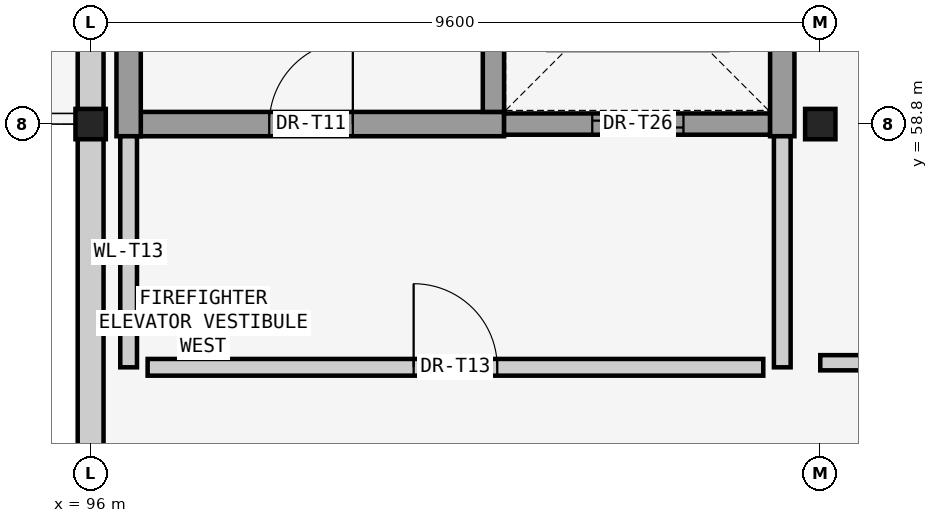
"""IFC4 building model, lengths in metres.
Left out: names, types, materials, properties, quantities, classifications, styles, units other than length and angle.
Written with IfcOpenShell. Run it as: python <this file> out.ifc"""

import sys

from ifc_helpers import new_model, si_unit, direction, frame, frame_2d, origin, origin_2d, place, context, subcontext, project, spatial, rectangle, i_section, extrude, element, fill, save


model = new_model("IFC4")
c1 = context("Model", 3, precision=1e-05, world=origin(), true_north=direction((0.0, 1.0)))
c2 = subcontext(c1, "Body", "Model", "MODEL_VIEW")
j1 = project(units=[si_unit("LENGTHUNIT", "METRE"), si_unit("PLANEANGLEUNIT", "RADIAN")], contexts=[c1])
p1 = place(None, origin())
s1 = spatial("IfcSite", under=j1, at=p1, CompositionType="ELEMENT")
p2 = place(p1, origin())
s2 = spatial("IfcBuilding", under=s1, at=p2, CompositionType="ELEMENT")
p3 = place(p2, frame((0.0, 0.0, 15.0)))
s3 = spatial("IfcBuildingStorey", under=s2, at=p3, CompositionType="ELEMENT", Elevation=15.0)
p4 = place(p3, frame((96.0, 58.8, 0.0), z_axis=(0.0, 0.0, 1.0), x_axis=(1.0, 0.0, 0.0)))
e1 = element("IfcColumn", 1, at=p4, inside=s3, PredefinedType="COLUMN", context=c2, shape_type="SweptSolid", body=[
    extrude(i_section(OverallWidth=0.399, OverallDepth=0.399, WebThickness=0.03, FlangeThickness=0.039, at=origin_2d()), origin(), (0.0, 0.0, 1.0), 4.5),
])
p5 = place(p3, frame((105.6, 58.8, 0.0), z_axis=(0.0, 0.0, 1.0), x_axis=(1.0, 0.0, 0.0)))
e2 = element("IfcColumn", 2, at=p5, inside=s3, PredefinedType="COLUMN", context=c2, shape_type="SweptSolid", body=[
    extrude(i_section(OverallWidth=0.399, OverallDepth=0.399, WebThickness=0.03, FlangeThickness=0.039, at=origin_2d()), origin(), (0.0, 0.0, 1.0), 4.58),
])
p6 = place(p3, frame((96.0, 52.012, 0.0), z_axis=(0.0, 0.0, 1.0), x_axis=(0.0, 1.0, 0.0)))
e3 = element("IfcWall", 3, at=p6, inside=s3, PredefinedType="SOLIDWALL", context=c2, shape_type="SweptSolid", body=[
    extrude(rectangle(XDim=15.158, YDim=0.34, at=frame_2d((7.579, 0.0))), origin(), (0.0, 0.0, 1.0), 3.777),
])
p7 = place(p3, frame((96.66, 58.8, 0.0), z_axis=(0.0, 0.0, 1.0), x_axis=(1.0, 0.0, 0.0)))
e4 = element("IfcWall", 4, at=p7, inside=s3, PredefinedType="SHEAR", context=c2, shape_type="SweptSolid", body=[
    extrude(rectangle(XDim=4.78, YDim=0.32, at=frame_2d((2.39, 0.0))), origin(), (0.0, 0.0, 1.0), 4.56),
])
p8 = place(p7, frame((1.69, 0.0, 0.0)))
e5 = element("IfcOpeningElement", 5, at=p8, cuts=e4, PredefinedType="OPENING", context=c2, shape_type="SweptSolid", body=[
    extrude(rectangle(XDim=1.1, YDim=2.2, at=frame_2d((0.55, 1.1))), frame((0.0, 0.17, 0.0), z_axis=(0.0, -1.0, 0.0), x_axis=(1.0, 0.0, 0.0)), (0.0, 0.0, 1.0), 0.34),
])
p9 = place(p3, frame((101.44, 58.8, 0.0), z_axis=(0.0, 0.0, 1.0), x_axis=(1.0, 0.0, 0.0)))
e6 = element("IfcWall", 6, at=p9, inside=s3, PredefinedType="SHEAR", context=c2, shape_type="SweptSolid", body=[
    extrude(rectangle(XDim=3.5, YDim=0.28, at=frame_2d((1.75, 0.0))), origin(), (0.0, 0.0, 1.0), 4.56),
])
p10 = place(p9, frame((1.16, 0.0, 0.0)))
e7 = element("IfcOpeningElement", 7, at=p10, cuts=e6, PredefinedType="OPENING", context=c2, shape_type="SweptSolid", body=[
    extrude(rectangle(XDim=1.2, YDim=2.2, at=frame_2d((0.6, 1.1))), frame((0.0, 0.15, 0.0), z_axis=(0.0, -1.0, 0.0), x_axis=(1.0, 0.0, 0.0)), (0.0, 0.0, 1.0), 0.3),
])
for number, where, z_axis, x_axis in (
    (8, (96.5, 67.0, 0.0), (0.0, 0.0, 1.0), (0.0, -1.0, 0.0)),
    (9, (105.1, 58.64, 0.0), (0.0, 0.0, 1.0), (0.0, 1.0, 0.0)),
):
    element("IfcWall", number, at=place(p3, frame(where, z_axis=z_axis, x_axis=x_axis)), inside=s3, PredefinedType="SHEAR", context=c2, shape_type="SweptSolid", body=[
        extrude(rectangle(XDim=8.36, YDim=0.32, at=frame_2d((4.18, 0.0))), origin(), (0.0, 0.0, 1.0), 4.56),
    ])
p11 = place(p3, frame((101.3, 58.96, 0.0), z_axis=(0.0, 0.0, 1.0), x_axis=(0.0, 1.0, 0.0)))
e10 = element("IfcWall", 10, at=p11, inside=s3, PredefinedType="SHEAR", context=c2, shape_type="SweptSolid", body=[
    extrude(rectangle(XDim=7.72, YDim=0.28, at=frame_2d((3.86, 0.0))), origin(), (0.0, 0.0, 1.0), 4.56),
])
for number, where, z_axis, x_axis in (
    (11, (96.5, 55.6, 0.0), (0.0, 0.0, 1.0), (0.0, 1.0, 0.0)),
    (12, (105.1, 55.6, 0.0), (0.0, 0.0, 1.0), (0.0, 1.0, 0.0)),
):
    element("IfcWall", number, at=place(p3, frame(where, z_axis=z_axis, x_axis=x_axis)), inside=s3, PredefinedType="SOLIDWALL", context=c2, shape_type="SweptSolid", body=[
        extrude(rectangle(XDim=3.04, YDim=0.22, at=frame_2d((1.52, 0.0))), origin(), (0.0, 0.0, 1.0), 4.32),
    ])
p12 = place(p3, frame((96.75, 55.6, 0.0), z_axis=(0.0, 0.0, 1.0), x_axis=(1.0, 0.0, 0.0)))
e13 = element("IfcWall", 13, at=p12, inside=s3, PredefinedType="SOLIDWALL", context=c2, shape_type="SweptSolid", body=[
    extrude(rectangle(XDim=8.1, YDim=0.22, at=frame_2d((4.05, 0.0))), origin(), (0.0, 0.0, 1.0), 4.32),
])
p13 = place(p12, frame((3.5, 0.0, 0.0)))
e14 = element("IfcOpeningElement", 14, at=p13, cuts=e13, PredefinedType="OPENING", context=c2, shape_type="SweptSolid", body=[
    extrude(rectangle(XDim=1.1, YDim=2.2, at=frame_2d((0.55, 1.1))), frame((0.0, 0.12, 0.0), z_axis=(0.0, -1.0, 0.0), x_axis=(1.0, 0.0, 0.0)), (0.0, 0.0, 1.0), 0.24),
])
p14 = place(p3, frame((105.6, 55.66, 0.0), z_axis=(0.0, 0.0, 1.0), x_axis=(1.0, 0.0, 0.0)))
e15 = element("IfcWall", 15, at=p14, inside=s3, PredefinedType="SOLIDWALL", context=c2, shape_type="SweptSolid", body=[
    extrude(rectangle(XDim=19.4, YDim=0.2, at=frame_2d((9.7, 0.0))), origin(), (0.0, 0.0, 1.0), 4.45),
])
p15 = place(p14, frame((9.225, 0.0, 0.0)))
e16 = element("IfcOpeningElement", 16, at=p15, cuts=e15, PredefinedType="OPENING", context=c2, shape_type="SweptSolid", body=[
    extrude(rectangle(XDim=0.95, YDim=2.15, at=frame_2d((0.475, 1.075))), frame((0.0, 0.11, 0.0), z_axis=(0.0, -1.0, 0.0), x_axis=(1.0, 0.0, 0.0)), (0.0, 0.0, 1.0), 0.22),
])
p16 = place(p8, origin())
e17 = element("IfcDoor", 17, at=p16, inside=s3, OperationType="SINGLE_SWING_RIGHT", PredefinedType="DOOR", context=c2, shape_type="SweptSolid", body=[
    extrude(rectangle(XDim=1.1, YDim=2.2, at=frame_2d((0.55, 1.1))), frame((0.0, 0.025, 0.0), z_axis=(0.0, -1.0, 0.0), x_axis=(1.0, 0.0, 0.0)), (0.0, 0.0, 1.0), 0.05),
])
fill(e5, e17)
p17 = place(p10, origin())
e18 = element("IfcDoor", 18, at=p17, inside=s3, OperationType="SLIDING_TO_RIGHT", PredefinedType="DOOR", context=c2, shape_type="SweptSolid", body=[
    extrude(rectangle(XDim=1.2, YDim=2.2, at=frame_2d((0.6, 1.1))), frame((0.0, 0.025, 0.0), z_axis=(0.0, -1.0, 0.0), x_axis=(1.0, 0.0, 0.0)), (0.0, 0.0, 1.0), 0.05),
])
fill(e7, e18)
p18 = place(p13, origin())
e19 = element("IfcDoor", 19, at=p18, inside=s3, OperationType="SINGLE_SWING_LEFT", PredefinedType="DOOR", context=c2, shape_type="SweptSolid", body=[
    extrude(rectangle(XDim=1.1, YDim=2.2, at=frame_2d((0.55, 1.1))), frame((0.0, 0.025, 0.0), z_axis=(0.0, -1.0, 0.0), x_axis=(1.0, 0.0, 0.0)), (0.0, 0.0, 1.0), 0.05),
])
fill(e14, e19)
save(model, sys.argv[1])
